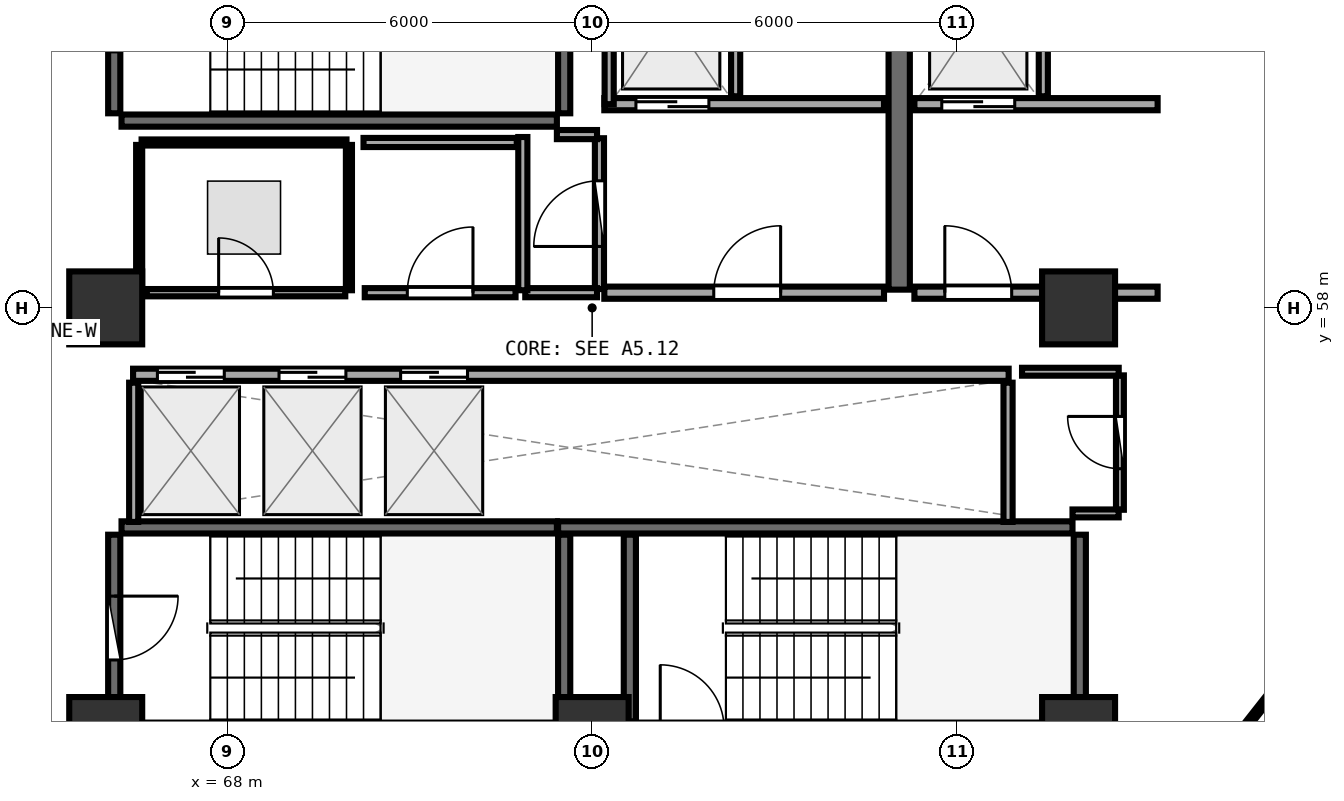
"""IFC4 building model, lengths in metres.
Left out: names, types, materials, properties, quantities, classifications, styles, units other than length and angle.
Written with IfcOpenShell. Run it as: python <this file> out.ifc"""

import sys

from ifc_helpers import new_model, si_unit, direction, frame, frame_2d, origin, origin_2d, place, context, subcontext, project, spatial, rectangle, extrude, element, fill, save


model = new_model("IFC4")
c1 = context("Model", 3, precision=1e-05, world=origin(), true_north=direction((0.0, 1.0)))
c2 = subcontext(c1, "Body", "Model", "MODEL_VIEW")
j1 = project(units=[si_unit("LENGTHUNIT", "METRE"), si_unit("PLANEANGLEUNIT", "RADIAN")], contexts=[c1])
p1 = place(None, origin())
s1 = spatial("IfcSite", under=j1, at=p1, CompositionType="ELEMENT")
p2 = place(p1, origin())
s2 = spatial("IfcBuilding", under=s1, at=p2, CompositionType="ELEMENT")
p3 = place(p2, frame((0.0, 0.0, 200.7)))
s3 = spatial("IfcBuildingStorey", under=s2, at=p3, CompositionType="ELEMENT", Elevation=200.7)
for number, where, z_axis, x_axis in (
    (1, (66.0, 51.0, 0.0), (0.0, 0.0, 1.0), (1.0, 0.0, 0.0)),
    (2, (74.0, 51.0, 0.0), (0.0, 0.0, 1.0), (1.0, 0.0, 0.0)),
    (3, (82.0, 51.0, 0.0), (0.0, 0.0, 1.0), (1.0, 0.0, 0.0)),
    (4, (82.0, 58.0, 0.0), (0.0, 0.0, 1.0), (1.0, 0.0, 0.0)),
    (5, (66.0, 58.0, 0.0), (0.0, 0.0, 1.0), (1.0, 0.0, 0.0)),
):
    element("IfcColumn", number, at=place(p3, frame(where, z_axis=z_axis, x_axis=x_axis)), inside=s3, PredefinedType="PILASTER", context=c2, shape_type="SweptSolid", body=[
        extrude(rectangle(XDim=1.2, YDim=1.2, at=origin_2d()), origin(), (0.0, 0.0, 1.0), 3.75),
    ])
p4 = place(p3, frame((66.26, 61.08, 0.0), z_axis=(0.0, 0.0, 1.0), x_axis=(1.0, 0.0, 0.0)))
e6 = element("IfcWall", 6, at=p4, inside=s3, PredefinedType="SHEAR", context=c2, shape_type="SweptSolid", body=[
    extrude(rectangle(XDim=7.16, YDim=0.2, at=frame_2d((3.58, 0.0))), origin(), (0.0, 0.0, 1.0), 3.49),
])
p5 = place(p3, frame((73.54, 61.2, 0.0), z_axis=(0.0, 0.0, 1.0), x_axis=(0.0, 1.0, 0.0)))
e7 = element("IfcWall", 7, at=p5, inside=s3, PredefinedType="SHEAR", context=c2, shape_type="SweptSolid", body=[
    extrude(rectangle(XDim=3.07, YDim=0.2, at=frame_2d((1.535, 0.0))), origin(), (0.0, 0.0, 1.0), 3.49),
])
p6 = place(p3, frame((66.14, 64.27, 0.0), z_axis=(0.0, 0.0, 1.0), x_axis=(0.0, -1.0, 0.0)))
e8 = element("IfcWall", 8, at=p6, inside=s3, PredefinedType="SHEAR", context=c2, shape_type="SweptSolid", body=[
    extrude(rectangle(XDim=3.07, YDim=0.2, at=frame_2d((1.535, 0.0))), origin(), (0.0, 0.0, 1.0), 3.49),
])
p7 = place(p6, frame((1.01, 0.0, 0.0)))
e9 = element("IfcOpeningElement", 9, at=p7, cuts=e8, PredefinedType="OPENING", context=c2, shape_type="SweptSolid", body=[
    extrude(rectangle(XDim=1.05, YDim=2.1, at=frame_2d((0.525, 1.05))), frame((0.0, 0.11, 0.0), z_axis=(0.0, -1.0, 0.0), x_axis=(1.0, 0.0, 0.0)), (0.0, 0.0, 1.0), 0.22),
])
p8 = place(p3, frame((82.02, 51.2, 0.0), z_axis=(0.0, 0.0, 1.0), x_axis=(0.0, 1.0, 0.0)))
e10 = element("IfcWall", 10, at=p8, inside=s3, PredefinedType="SHEAR", context=c2, shape_type="SweptSolid", body=[
    extrude(rectangle(XDim=3.07, YDim=0.2, at=frame_2d((1.535, 0.0))), origin(), (0.0, 0.0, 1.0), 3.49),
])
p9 = place(p3, frame((81.9, 54.39, 0.0), z_axis=(0.0, 0.0, 1.0), x_axis=(-1.0, 0.0, 0.0)))
e11 = element("IfcWall", 11, at=p9, inside=s3, PredefinedType="SHEAR", context=c2, shape_type="SweptSolid", body=[
    extrude(rectangle(XDim=8.46, YDim=0.2, at=frame_2d((4.23, 0.0))), origin(), (0.0, 0.0, 1.0), 3.49),
])
for number, where, z_axis, x_axis in (
    (12, (74.62, 54.27, 0.0), (0.0, 0.0, 1.0), (0.0, -1.0, 0.0)),
    (13, (73.54, 51.2, 0.0), (0.0, 0.0, 1.0), (0.0, 1.0, 0.0)),
):
    element("IfcWall", number, at=place(p3, frame(where, z_axis=z_axis, x_axis=x_axis)), inside=s3, PredefinedType="SHEAR", context=c2, shape_type="SweptSolid", body=[
        extrude(rectangle(XDim=3.07, YDim=0.2, at=frame_2d((1.535, 0.0))), origin(), (0.0, 0.0, 1.0), 3.49),
    ])
p10 = place(p3, frame((73.42, 54.39, 0.0), z_axis=(0.0, 0.0, 1.0), x_axis=(-1.0, 0.0, 0.0)))
e14 = element("IfcWall", 14, at=p10, inside=s3, PredefinedType="SHEAR", context=c2, shape_type="SweptSolid", body=[
    extrude(rectangle(XDim=7.16, YDim=0.2, at=frame_2d((3.58, 0.0))), origin(), (0.0, 0.0, 1.0), 3.49),
])
p11 = place(p3, frame((66.14, 54.27, 0.0), z_axis=(0.0, 0.0, 1.0), x_axis=(0.0, -1.0, 0.0)))
e15 = element("IfcWall", 15, at=p11, inside=s3, PredefinedType="SHEAR", context=c2, shape_type="SweptSolid", body=[
    extrude(rectangle(XDim=3.07, YDim=0.2, at=frame_2d((1.535, 0.0))), origin(), (0.0, 0.0, 1.0), 3.49),
])
p12 = place(p11, frame((1.01, 0.0, 0.0)))
e16 = element("IfcOpeningElement", 16, at=p12, cuts=e15, PredefinedType="OPENING", context=c2, shape_type="SweptSolid", body=[
    extrude(rectangle(XDim=1.05, YDim=2.1, at=frame_2d((0.525, 1.05))), frame((0.0, 0.11, 0.0), z_axis=(0.0, -1.0, 0.0), x_axis=(1.0, 0.0, 0.0)), (0.0, 0.0, 1.0), 0.22),
])
p13 = place(p3, frame((79.05, 58.3, 0.0), z_axis=(0.0, 0.0, 1.0), x_axis=(0.0, 1.0, 0.0)))
e17 = element("IfcWall", 17, at=p13, inside=s3, PredefinedType="SHEAR", context=c2, shape_type="SweptSolid", body=[
    extrude(rectangle(XDim=6.3, YDim=0.35, at=frame_2d((3.15, 0.0))), origin(), (0.0, 0.0, 1.0), 3.49),
])
p14 = place(p3, frame((74.2, 61.35, 0.0), z_axis=(0.0, 0.0, 1.0), x_axis=(1.0, 0.0, 0.0)))
e18 = element("IfcWall", 18, at=p14, inside=s3, PredefinedType="SOLIDWALL", context=c2, shape_type="SweptSolid", body=[
    extrude(rectangle(XDim=4.6, YDim=0.2, at=frame_2d((2.3, 0.0))), origin(), (0.0, 0.0, 1.0), 3.48),
])
p15 = place(p14, frame((0.52, 0.0, 0.0)))
e19 = element("IfcOpeningElement", 19, at=p15, cuts=e18, PredefinedType="OPENING", context=c2, shape_type="SweptSolid", body=[
    extrude(rectangle(XDim=1.2, YDim=2.15, at=frame_2d((0.6, 1.075))), frame((0.0, 0.11, 0.0), z_axis=(0.0, -1.0, 0.0), x_axis=(1.0, 0.0, 0.0)), (0.0, 0.0, 1.0), 0.22),
])
p16 = place(p3, frame((74.28, 61.35, 0.0), z_axis=(0.0, 0.0, 1.0), x_axis=(0.0, 1.0, 0.0)))
e20 = element("IfcWall", 20, at=p16, inside=s3, PredefinedType="PARTITIONING", context=c2, shape_type="SweptSolid", body=[
    extrude(rectangle(XDim=2.97, YDim=0.15, at=frame_2d((1.485, 0.0))), origin(), (0.0, 0.0, 1.0), 3.48),
])
p17 = place(p3, frame((76.36, 61.48, 0.0), z_axis=(0.0, 0.0, 1.0), x_axis=(0.0, 1.0, 0.0)))
e21 = element("IfcWall", 21, at=p17, inside=s3, PredefinedType="PARTITIONING", context=c2, shape_type="SweptSolid", body=[
    extrude(rectangle(XDim=2.84, YDim=0.15, at=frame_2d((1.42, 0.0))), origin(), (0.0, 0.0, 1.0), 3.48),
])
p18 = place(p3, frame((79.3, 61.35, 0.0), z_axis=(0.0, 0.0, 1.0), x_axis=(1.0, 0.0, 0.0)))
e22 = element("IfcWall", 22, at=p18, inside=s3, PredefinedType="SOLIDWALL", context=c2, shape_type="SweptSolid", body=[
    extrude(rectangle(XDim=4.0, YDim=0.2, at=frame_2d((2.0, 0.0))), origin(), (0.0, 0.0, 1.0), 2.775),
])
p19 = place(p18, frame((0.45, 0.0, 0.0)))
e23 = element("IfcOpeningElement", 23, at=p19, cuts=e22, PredefinedType="OPENING", context=c2, shape_type="SweptSolid", body=[
    extrude(rectangle(XDim=1.2, YDim=2.15, at=frame_2d((0.6, 1.075))), frame((0.0, 0.11, 0.0), z_axis=(0.0, -1.0, 0.0), x_axis=(1.0, 0.0, 0.0)), (0.0, 0.0, 1.0), 0.22),
])
p20 = place(p3, frame((81.42, 61.48, 0.0), z_axis=(0.0, 0.0, 1.0), x_axis=(0.0, 1.0, 0.0)))
e24 = element("IfcWall", 24, at=p20, inside=s3, PredefinedType="PARTITIONING", context=c2, shape_type="SweptSolid", body=[
    extrude(rectangle(XDim=2.84, YDim=0.15, at=frame_2d((1.42, 0.0))), origin(), (0.0, 0.0, 1.0), 3.48),
])
p21 = place(p3, frame((74.2, 58.25, 0.0), z_axis=(0.0, 0.0, 1.0), x_axis=(1.0, 0.0, 0.0)))
e25 = element("IfcWall", 25, at=p21, inside=s3, PredefinedType="SOLIDWALL", context=c2, shape_type="SweptSolid", body=[
    extrude(rectangle(XDim=4.6, YDim=0.2, at=frame_2d((2.3, 0.0))), origin(), (0.0, 0.0, 1.0), 3.48),
])
p22 = place(p21, frame((1.8, 0.0, 0.0)))
e26 = element("IfcOpeningElement", 26, at=p22, cuts=e25, PredefinedType="OPENING", context=c2, shape_type="SweptSolid", body=[
    extrude(rectangle(XDim=1.1, YDim=2.1, at=frame_2d((0.55, 1.05))), frame((0.0, 0.11, 0.0), z_axis=(0.0, -1.0, 0.0), x_axis=(1.0, 0.0, 0.0)), (0.0, 0.0, 1.0), 0.22),
])
p23 = place(p3, frame((79.3, 58.25, 0.0), z_axis=(0.0, 0.0, 1.0), x_axis=(1.0, 0.0, 0.0)))
e27 = element("IfcWall", 27, at=p23, inside=s3, PredefinedType="SOLIDWALL", context=c2, shape_type="SweptSolid", body=[
    extrude(rectangle(XDim=4.0, YDim=0.2, at=frame_2d((2.0, 0.0))), origin(), (0.0, 0.0, 1.0), 2.775),
])
p24 = place(p23, frame((0.5, 0.0, 0.0)))
e28 = element("IfcOpeningElement", 28, at=p24, cuts=e27, PredefinedType="OPENING", context=c2, shape_type="SweptSolid", body=[
    extrude(rectangle(XDim=1.1, YDim=2.1, at=frame_2d((0.55, 1.05))), frame((0.0, 0.11, 0.0), z_axis=(0.0, -1.0, 0.0), x_axis=(1.0, 0.0, 0.0)), (0.0, 0.0, 1.0), 0.22),
])
p25 = place(p3, frame((66.45, 56.9, 0.0), z_axis=(0.0, 0.0, 1.0), x_axis=(1.0, 0.0, 0.0)))
e29 = element("IfcWall", 29, at=p25, inside=s3, PredefinedType="SOLIDWALL", context=c2, shape_type="SweptSolid", body=[
    extrude(rectangle(XDim=14.4, YDim=0.2, at=frame_2d((7.2, 0.0))), origin(), (0.0, 0.0, 1.0), 3.48),
])
p26 = place(p25, frame((0.4, 0.0, 0.0)))
e30 = element("IfcOpeningElement", 30, at=p26, cuts=e29, PredefinedType="OPENING", context=c2, shape_type="SweptSolid", body=[
    extrude(rectangle(XDim=1.1, YDim=2.1, at=frame_2d((0.55, 1.05))), frame((0.0, 0.11, 0.0), z_axis=(0.0, -1.0, 0.0), x_axis=(1.0, 0.0, 0.0)), (0.0, 0.0, 1.0), 0.22),
])
p27 = place(p25, frame((2.4, 0.0, 0.0)))
e31 = element("IfcOpeningElement", 31, at=p27, cuts=e29, PredefinedType="OPENING", context=c2, shape_type="SweptSolid", body=[
    extrude(rectangle(XDim=1.1, YDim=2.1, at=frame_2d((0.55, 1.05))), frame((0.0, 0.11, 0.0), z_axis=(0.0, -1.0, 0.0), x_axis=(1.0, 0.0, 0.0)), (0.0, 0.0, 1.0), 0.22),
])
p28 = place(p25, frame((4.4, 0.0, 0.0)))
e32 = element("IfcOpeningElement", 32, at=p28, cuts=e29, PredefinedType="OPENING", context=c2, shape_type="SweptSolid", body=[
    extrude(rectangle(XDim=1.1, YDim=2.1, at=frame_2d((0.55, 1.05))), frame((0.0, 0.11, 0.0), z_axis=(0.0, -1.0, 0.0), x_axis=(1.0, 0.0, 0.0)), (0.0, 0.0, 1.0), 0.22),
])
for number, where, z_axis, x_axis in (
    (33, (66.46, 54.48, 0.0), (0.0, 0.0, 1.0), (0.0, 1.0, 0.0)),
    (34, (80.84, 54.48, 0.0), (0.0, 0.0, 1.0), (0.0, 1.0, 0.0)),
):
    element("IfcWall", number, at=place(p3, frame(where, z_axis=z_axis, x_axis=x_axis)), inside=s3, PredefinedType="PARTITIONING", context=c2, shape_type="SweptSolid", body=[
        extrude(rectangle(XDim=2.29, YDim=0.15, at=frame_2d((1.145, 0.0))), origin(), (0.0, 0.0, 1.0), 3.48),
    ])
p29 = place(p3, frame((74.12, 58.31, 0.0), z_axis=(0.0, 0.0, 1.0), x_axis=(0.0, 1.0, 0.0)))
e35 = element("IfcWall", 35, at=p29, inside=s3, PredefinedType="PARTITIONING", context=c2, shape_type="SweptSolid", body=[
    extrude(rectangle(XDim=2.48, YDim=0.15, at=frame_2d((1.24, 0.0))), origin(), (0.0, 0.0, 1.0), 3.48),
])
p30 = place(p29, frame((0.7, 0.0, 0.0)))
e36 = element("IfcOpeningElement", 36, at=p30, cuts=e35, PredefinedType="OPENING", context=c2, shape_type="SweptSolid", body=[
    extrude(rectangle(XDim=1.08, YDim=2.1, at=frame_2d((0.54, 1.05))), frame((0.0, 0.085, 0.0), z_axis=(0.0, -1.0, 0.0), x_axis=(1.0, 0.0, 0.0)), (0.0, 0.0, 1.0), 0.17),
])
p31 = place(p3, frame((82.68, 54.68, 0.0), z_axis=(0.0, 0.0, 1.0), x_axis=(0.0, 1.0, 0.0)))
e37 = element("IfcWall", 37, at=p31, inside=s3, PredefinedType="PLUMBINGWALL", context=c2, shape_type="SweptSolid", body=[
    extrude(rectangle(XDim=2.21, YDim=0.13, at=frame_2d((1.105, 0.0))), origin(), (0.0, 0.0, 1.0), 3.48),
])
p32 = place(p31, frame((0.675, 0.0, 0.0)))
e38 = element("IfcOpeningElement", 38, at=p32, cuts=e37, PredefinedType="OPENING", context=c2, shape_type="SweptSolid", body=[
    extrude(rectangle(XDim=0.86, YDim=2.05, at=frame_2d((0.43, 1.025))), frame((0.0, 0.075, 0.0), z_axis=(0.0, -1.0, 0.0), x_axis=(1.0, 0.0, 0.0)), (0.0, 0.0, 1.0), 0.15),
])
p33 = place(p3, frame((66.675, 58.25, 0.0), z_axis=(0.0, 0.0, 1.0), x_axis=(1.0, 0.0, 0.0)))
e39 = element("IfcWall", 39, at=p33, inside=s3, PredefinedType="PARTITIONING", context=c2, shape_type="SweptSolid", body=[
    extrude(rectangle(XDim=3.265, YDim=0.12, at=frame_2d((1.632, 0.0))), origin(), (0.0, 0.0, 1.0), 3.48),
])
p34 = place(p33, frame((1.182, 0.0, 0.0)))
e40 = element("IfcOpeningElement", 40, at=p34, cuts=e39, PredefinedType="OPENING", context=c2, shape_type="SweptSolid", body=[
    extrude(rectangle(XDim=0.9, YDim=2.08, at=frame_2d((0.45, 1.04))), frame((0.0, 0.07, 0.0), z_axis=(0.0, -1.0, 0.0), x_axis=(1.0, 0.0, 0.0)), (0.0, 0.0, 1.0), 0.14),
])
p35 = place(p3, frame((70.26, 58.25, 0.0), z_axis=(0.0, 0.0, 1.0), x_axis=(1.0, 0.0, 0.0)))
e41 = element("IfcWall", 41, at=p35, inside=s3, PredefinedType="PARTITIONING", context=c2, shape_type="SweptSolid", body=[
    extrude(rectangle(XDim=2.48, YDim=0.15, at=frame_2d((1.24, 0.0))), origin(), (0.0, 0.0, 1.0), 3.48),
])
p36 = place(p35, frame((0.7, 0.0, 0.0)))
e42 = element("IfcOpeningElement", 42, at=p36, cuts=e41, PredefinedType="OPENING", context=c2, shape_type="SweptSolid", body=[
    extrude(rectangle(XDim=1.08, YDim=2.1, at=frame_2d((0.54, 1.05))), frame((0.0, 0.085, 0.0), z_axis=(0.0, -1.0, 0.0), x_axis=(1.0, 0.0, 0.0)), (0.0, 0.0, 1.0), 0.17),
])
p37 = place(p3, frame((72.9, 58.25, 0.0), z_axis=(0.0, 0.0, 1.0), x_axis=(1.0, 0.0, 0.0)))
e43 = element("IfcWall", 43, at=p37, inside=s3, PredefinedType="PARTITIONING", context=c2, shape_type="SweptSolid", body=[
    extrude(rectangle(XDim=1.18, YDim=0.15, at=frame_2d((0.59, 0.0))), origin(), (0.0, 0.0, 1.0), 3.48),
])
p38 = place(p3, frame((74.08, 60.85, 0.0), z_axis=(0.0, 0.0, 1.0), x_axis=(-1.0, 0.0, 0.0)))
e44 = element("IfcWall", 44, at=p38, inside=s3, PredefinedType="PARTITIONING", context=c2, shape_type="SweptSolid", body=[
    extrude(rectangle(XDim=0.66, YDim=0.15, at=frame_2d((0.33, 0.0))), origin(), (0.0, 0.0, 1.0), 3.48),
])
p39 = place(p3, frame((72.86, 60.81, 0.0), z_axis=(0.0, 0.0, 1.0), x_axis=(0.0, -1.0, 0.0)))
e45 = element("IfcWall", 45, at=p39, inside=s3, PredefinedType="PARTITIONING", context=c2, shape_type="SweptSolid", body=[
    extrude(rectangle(XDim=2.52, YDim=0.15, at=frame_2d((1.26, 0.0))), origin(), (0.0, 0.0, 1.0), 3.48),
])
p40 = place(p3, frame((81.9, 54.62, 0.0), z_axis=(0.0, 0.0, 1.0), x_axis=(1.0, 0.0, 0.0)))
e46 = element("IfcWall", 46, at=p40, inside=s3, PredefinedType="PLUMBINGWALL", context=c2, shape_type="SweptSolid", body=[
    extrude(rectangle(XDim=0.76, YDim=0.13, at=frame_2d((0.38, 0.0))), origin(), (0.0, 0.0, 1.0), 2.775),
])
p41 = place(p3, frame((82.66, 56.95, 0.0), z_axis=(0.0, 0.0, 1.0), x_axis=(-1.0, 0.0, 0.0)))
e47 = element("IfcWall", 47, at=p41, inside=s3, PredefinedType="PLUMBINGWALL", context=c2, shape_type="SweptSolid", body=[
    extrude(rectangle(XDim=1.59, YDim=0.13, at=frame_2d((0.795, 0.0))), origin(), (0.0, 0.0, 1.0), 2.775),
])
p42 = place(p3, frame((70.0, 58.29, 0.0), z_axis=(0.0, 0.0, 1.0), x_axis=(0.0, 1.0, 0.0)))
e48 = element("IfcWall", 48, at=p42, inside=s3, PredefinedType="PARTITIONING", context=c2, shape_type="SweptSolid", body=[
    extrude(rectangle(XDim=2.39, YDim=0.1, at=frame_2d((1.195, 0.0))), origin(), (0.0, 0.0, 1.0), 3.48),
])
p43 = place(p3, frame((69.96, 60.72, 0.0), z_axis=(0.0, 0.0, 1.0), x_axis=(-1.0, 0.0, 0.0)))
e49 = element("IfcWall", 49, at=p43, inside=s3, PredefinedType="PARTITIONING", context=c2, shape_type="SweptSolid", body=[
    extrude(rectangle(XDim=3.37, YDim=0.1, at=frame_2d((1.685, 0.0))), origin(), (0.0, 0.0, 1.0), 3.48),
])
p44 = place(p3, frame((66.55, 60.68, 0.0), z_axis=(0.0, 0.0, 1.0), x_axis=(0.0, -1.0, 0.0)))
e50 = element("IfcWall", 50, at=p44, inside=s3, PredefinedType="PARTITIONING", context=c2, shape_type="SweptSolid", body=[
    extrude(rectangle(XDim=2.383, YDim=0.1, at=frame_2d((1.191, 0.0))), origin(), (0.0, 0.0, 1.0), 3.48),
])
p45 = place(p3, frame((72.76, 60.72, 0.0), z_axis=(0.0, 0.0, 1.0), x_axis=(-1.0, 0.0, 0.0)))
e51 = element("IfcWall", 51, at=p45, inside=s3, PredefinedType="PARTITIONING", context=c2, shape_type="SweptSolid", body=[
    extrude(rectangle(XDim=2.52, YDim=0.15, at=frame_2d((1.26, 0.0))), origin(), (0.0, 0.0, 1.0), 3.48),
])
p46 = place(p3, frame((82.628, 48.422, 0.0), z_axis=(0.0, 0.0, 1.0), x_axis=(0.618431543907, 0.785838676511, 0.0)))
e52 = element("IfcWall", 52, at=p46, inside=s3, PredefinedType="PARTITIONING", context=c2, shape_type="SweptSolid", body=[
    extrude(rectangle(XDim=6.962, YDim=0.1, at=frame_2d((3.481, 0.0))), origin(), (0.0, 0.0, 1.0), 3.025),
])
p47 = place(p3, frame((87.302, 61.018, 0.0), z_axis=(0.0, 0.0, 1.0), x_axis=(-0.497477595841, 0.867476824841, 0.0)))
e53 = element("IfcWall", 53, at=p47, inside=s3, PredefinedType="PARTITIONING", context=c2, shape_type="SweptSolid", body=[
    extrude(rectangle(XDim=5.713, YDim=0.1, at=frame_2d((2.856, 0.0))), origin(), (0.0, 0.0, 1.0), 3.025),
])
p48 = place(p12, origin())
e54 = element("IfcDoor", 54, at=p48, inside=s3, OperationType="SINGLE_SWING_LEFT", PredefinedType="DOOR", context=c2, shape_type="SweptSolid", body=[
    extrude(rectangle(XDim=1.05, YDim=2.1, at=frame_2d((0.525, 1.05))), frame((0.0, 0.025, 0.0), z_axis=(0.0, -1.0, 0.0), x_axis=(1.0, 0.0, 0.0)), (0.0, 0.0, 1.0), 0.05),
])
fill(e16, e54)
p49 = place(p15, origin())
e55 = element("IfcDoor", 55, at=p49, inside=s3, OperationType="DOUBLE_DOOR_SLIDING", PredefinedType="DOOR", context=c2, shape_type="SweptSolid", body=[
    extrude(rectangle(XDim=1.2, YDim=2.15, at=frame_2d((0.6, 1.075))), frame((0.0, 0.025, 0.0), z_axis=(0.0, -1.0, 0.0), x_axis=(1.0, 0.0, 0.0)), (0.0, 0.0, 1.0), 0.05),
])
fill(e19, e55)
p50 = place(p19, origin())
e56 = element("IfcDoor", 56, at=p50, inside=s3, OperationType="DOUBLE_DOOR_SLIDING", PredefinedType="DOOR", context=c2, shape_type="SweptSolid", body=[
    extrude(rectangle(XDim=1.2, YDim=2.15, at=frame_2d((0.6, 1.075))), frame((0.0, 0.025, 0.0), z_axis=(0.0, -1.0, 0.0), x_axis=(1.0, 0.0, 0.0)), (0.0, 0.0, 1.0), 0.05),
])
fill(e23, e56)
p51 = place(p22, frame((1.1, 0.0, 0.0), z_axis=(0.0, 0.0, 1.0), x_axis=(-1.0, 0.0, 0.0)))
e57 = element("IfcDoor", 57, at=p51, inside=s3, OperationType="SINGLE_SWING_LEFT", PredefinedType="DOOR", context=c2, shape_type="SweptSolid", body=[
    extrude(rectangle(XDim=1.1, YDim=2.1, at=frame_2d((0.55, 1.05))), frame((0.0, 0.025, 0.0), z_axis=(0.0, -1.0, 0.0), x_axis=(1.0, 0.0, 0.0)), (0.0, 0.0, 1.0), 0.05),
])
fill(e26, e57)
p52 = place(p24, frame((1.1, 0.0, 0.0), z_axis=(0.0, 0.0, 1.0), x_axis=(-1.0, 0.0, 0.0)))
e58 = element("IfcDoor", 58, at=p52, inside=s3, OperationType="SINGLE_SWING_RIGHT", PredefinedType="DOOR", context=c2, shape_type="SweptSolid", body=[
    extrude(rectangle(XDim=1.1, YDim=2.1, at=frame_2d((0.55, 1.05))), frame((0.0, 0.025, 0.0), z_axis=(0.0, -1.0, 0.0), x_axis=(1.0, 0.0, 0.0)), (0.0, 0.0, 1.0), 0.05),
])
fill(e28, e58)
p53 = place(p26, origin())
e59 = element("IfcDoor", 59, at=p53, inside=s3, OperationType="DOUBLE_DOOR_SLIDING", PredefinedType="DOOR", context=c2, shape_type="SweptSolid", body=[
    extrude(rectangle(XDim=1.1, YDim=2.1, at=frame_2d((0.55, 1.05))), frame((0.0, 0.025, 0.0), z_axis=(0.0, -1.0, 0.0), x_axis=(1.0, 0.0, 0.0)), (0.0, 0.0, 1.0), 0.05),
])
fill(e30, e59)
p54 = place(p27, origin())
e60 = element("IfcDoor", 60, at=p54, inside=s3, OperationType="DOUBLE_DOOR_SLIDING", PredefinedType="DOOR", context=c2, shape_type="SweptSolid", body=[
    extrude(rectangle(XDim=1.1, YDim=2.1, at=frame_2d((0.55, 1.05))), frame((0.0, 0.025, 0.0), z_axis=(0.0, -1.0, 0.0), x_axis=(1.0, 0.0, 0.0)), (0.0, 0.0, 1.0), 0.05),
])
fill(e31, e60)
p55 = place(p28, origin())
e61 = element("IfcDoor", 61, at=p55, inside=s3, OperationType="DOUBLE_DOOR_SLIDING", PredefinedType="DOOR", context=c2, shape_type="SweptSolid", body=[
    extrude(rectangle(XDim=1.1, YDim=2.1, at=frame_2d((0.55, 1.05))), frame((0.0, 0.025, 0.0), z_axis=(0.0, -1.0, 0.0), x_axis=(1.0, 0.0, 0.0)), (0.0, 0.0, 1.0), 0.05),
])
fill(e32, e61)
p56 = place(p30, origin())
e62 = element("IfcDoor", 62, at=p56, inside=s3, OperationType="SINGLE_SWING_LEFT", PredefinedType="DOOR", context=c2, shape_type="SweptSolid", body=[
    extrude(rectangle(XDim=1.08, YDim=2.1, at=frame_2d((0.54, 1.05))), frame((0.0, 0.025, 0.0), z_axis=(0.0, -1.0, 0.0), x_axis=(1.0, 0.0, 0.0)), (0.0, 0.0, 1.0), 0.05),
])
fill(e36, e62)
p57 = place(p32, origin())
e63 = element("IfcDoor", 63, at=p57, inside=s3, OperationType="SINGLE_SWING_RIGHT", PredefinedType="DOOR", context=c2, shape_type="SweptSolid", body=[
    extrude(rectangle(XDim=0.86, YDim=2.05, at=frame_2d((0.43, 1.025))), frame((0.0, 0.025, 0.0), z_axis=(0.0, -1.0, 0.0), x_axis=(1.0, 0.0, 0.0)), (0.0, 0.0, 1.0), 0.05),
])
fill(e38, e63)
p58 = place(p34, origin())
e64 = element("IfcDoor", 64, at=p58, inside=s3, OperationType="SINGLE_SWING_LEFT", PredefinedType="DOOR", context=c2, shape_type="SweptSolid", body=[
    extrude(rectangle(XDim=0.9, YDim=2.08, at=frame_2d((0.45, 1.04))), frame((0.0, 0.025, 0.0), z_axis=(0.0, -1.0, 0.0), x_axis=(1.0, 0.0, 0.0)), (0.0, 0.0, 1.0), 0.05),
])
fill(e40, e64)
p59 = place(p36, origin())
e65 = element("IfcDoor", 65, at=p59, inside=s3, OperationType="SINGLE_SWING_RIGHT", PredefinedType="DOOR", context=c2, shape_type="SweptSolid", body=[
    extrude(rectangle(XDim=1.08, YDim=2.1, at=frame_2d((0.54, 1.05))), frame((0.0, 0.025, 0.0), z_axis=(0.0, -1.0, 0.0), x_axis=(1.0, 0.0, 0.0)), (0.0, 0.0, 1.0), 0.05),
])
fill(e42, e65)
save(model, sys.argv[1])
